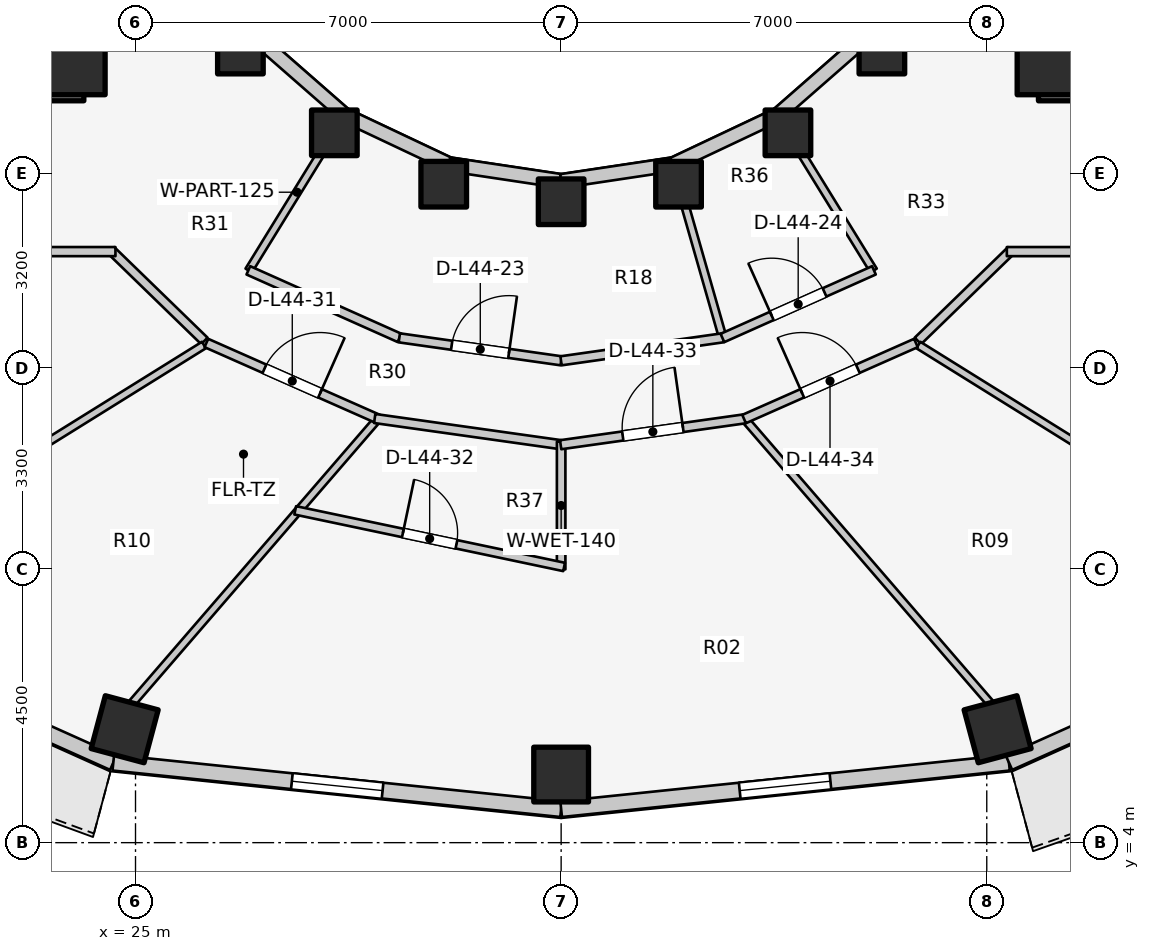
"""IFC4 building model, lengths in metres.
Left out: names, types, materials, properties, quantities, classifications, styles, units other than length and angle.
Written with IfcOpenShell. Run it as: python <this file> out.ifc"""

import sys

from ifc_helpers import new_model, si_unit, direction, frame, frame_2d, origin, origin_2d, place, context, subcontext, project, spatial, rectangle, extrude, element, fill, save


model = new_model("IFC4")
c1 = context("Model", 3, precision=1e-05, world=origin(), true_north=direction((0.0, 1.0)))
c2 = subcontext(c1, "Body", "Model", "MODEL_VIEW")
j1 = project(units=[si_unit("LENGTHUNIT", "METRE"), si_unit("PLANEANGLEUNIT", "RADIAN")], contexts=[c1])
p1 = place(None, origin())
s1 = spatial("IfcSite", under=j1, at=p1, CompositionType="ELEMENT")
p2 = place(p1, origin())
s2 = spatial("IfcBuilding", under=s1, at=p2, CompositionType="ELEMENT")
p3 = place(p2, frame((0.0, 0.0, 146.7)))
s3 = spatial("IfcBuildingStorey", under=s2, at=p3, CompositionType="ELEMENT", Elevation=146.7)
for number, where, z_axis, x_axis in (
    (1, (19.65, 16.55, 0.0), (0.0, 0.0, 1.0), (1.0, 0.0, 0.0)),
    (2, (39.85, 16.55, 0.0), (0.0, 0.0, 1.0), (1.0, 0.0, 0.0)),
):
    element("IfcWall", number, at=place(p3, frame(where, z_axis=z_axis, x_axis=x_axis)), inside=s3, PredefinedType="SHEAR", context=c2, shape_type="SweptSolid", body=[
        extrude(rectangle(XDim=4.5, YDim=0.7, at=frame_2d((2.25, 0.0))), origin(), (0.0, 0.0, 1.0), 3.1),
    ])
for number, where, z_axis, x_axis in (
    (3, (23.9, 16.9, 0.0), (0.0, 0.0, 1.0), (1.0, 0.0, 0.0)),
    (4, (40.1, 16.9, 0.0), (0.0, 0.0, 1.0), (1.0, 0.0, 0.0)),
):
    element("IfcColumn", number, at=place(p3, frame(where, z_axis=z_axis, x_axis=x_axis)), inside=s3, PredefinedType="COLUMN", context=c2, shape_type="SweptSolid", body=[
        extrude(rectangle(XDim=1.2, YDim=1.2, at=origin_2d()), origin(), (0.0, 0.0, 1.0), 3.1),
    ])
for number, where, z_axis, x_axis in (
    (5, (26.725, 17.018, 0.0), (0.0, 0.0, 1.0), (1.0, 0.0, 0.0)),
    (6, (28.27, 15.673, 0.0), (0.0, 0.0, 1.0), (1.0, 0.0, 0.0)),
    (7, (30.069, 14.828, 0.0), (0.0, 0.0, 1.0), (1.0, 0.0, 0.0)),
):
    element("IfcColumn", number, at=place(p3, frame(where, z_axis=z_axis, x_axis=x_axis)), inside=s3, PredefinedType="COLUMN", context=c2, shape_type="SweptSolid", body=[
        extrude(rectangle(XDim=0.75, YDim=0.75, at=origin_2d()), origin(), (0.0, 0.0, 1.0), 3.1),
    ])
p4 = place(p3, frame((24.822, 5.865, 0.0), z_axis=(0.0, 0.0, 1.0), x_axis=(-0.258819045103, -0.965925826289, 0.0)))
e8 = element("IfcColumn", 8, at=p4, inside=s3, PredefinedType="COLUMN", context=c2, shape_type="SweptSolid", body=[
    extrude(rectangle(XDim=0.9, YDim=0.9, at=origin_2d()), origin(), (0.0, 0.0, 1.0), 3.1),
])
p5 = place(p3, frame((32.0, 14.54, 0.0), z_axis=(0.0, 0.0, 1.0), x_axis=(1.0, 0.0, 0.0)))
e9 = element("IfcColumn", 9, at=p5, inside=s3, PredefinedType="COLUMN", context=c2, shape_type="SweptSolid", body=[
    extrude(rectangle(XDim=0.75, YDim=0.75, at=origin_2d()), origin(), (0.0, 0.0, 1.0), 3.1),
])
p6 = place(p3, frame((32.0, 5.12, 0.0), z_axis=(0.0, 0.0, 1.0), x_axis=(0.0, -1.0, 0.0)))
e10 = element("IfcColumn", 10, at=p6, inside=s3, PredefinedType="COLUMN", context=c2, shape_type="SweptSolid", body=[
    extrude(rectangle(XDim=0.9, YDim=0.9, at=origin_2d()), origin(), (0.0, 0.0, 1.0), 3.1),
])
p7 = place(p3, frame((33.931, 14.828, 0.0), z_axis=(0.0, 0.0, 1.0), x_axis=(1.0, 0.0, 0.0)))
e11 = element("IfcColumn", 11, at=p7, inside=s3, PredefinedType="COLUMN", context=c2, shape_type="SweptSolid", body=[
    extrude(rectangle(XDim=0.75, YDim=0.75, at=origin_2d()), origin(), (0.0, 0.0, 1.0), 3.1),
])
p8 = place(p3, frame((39.178, 5.865, 0.0), z_axis=(0.0, 0.0, 1.0), x_axis=(0.258819045103, -0.965925826289, 0.0)))
e12 = element("IfcColumn", 12, at=p8, inside=s3, PredefinedType="COLUMN", context=c2, shape_type="SweptSolid", body=[
    extrude(rectangle(XDim=0.9, YDim=0.9, at=origin_2d()), origin(), (0.0, 0.0, 1.0), 3.1),
])
for number, where, z_axis, x_axis in (
    (13, (35.73, 15.673, 0.0), (0.0, 0.0, 1.0), (1.0, 0.0, 0.0)),
    (14, (37.275, 17.018, 0.0), (0.0, 0.0, 1.0), (1.0, 0.0, 0.0)),
):
    element("IfcColumn", number, at=place(p3, frame(where, z_axis=z_axis, x_axis=x_axis)), inside=s3, PredefinedType="COLUMN", context=c2, shape_type="SweptSolid", body=[
        extrude(rectangle(XDim=0.75, YDim=0.75, at=origin_2d()), origin(), (0.0, 0.0, 1.0), 3.1),
    ])
p9 = place(p3, frame((26.965, 17.258, 0.0), z_axis=(0.0, 0.0, 1.0), x_axis=(0.752576694707, -0.658504607869, 0.0)))
e15 = element("IfcWall", 15, at=p9, inside=s3, PredefinedType="STANDARD", context=c2, shape_type="SweptSolid", body=[
    extrude(rectangle(XDim=1.959, YDim=0.23, at=frame_2d((0.98, 0.0))), origin(), (0.0, 0.0, 1.0), 2.16),
])
p10 = place(p3, frame((28.44, 15.968, 0.0), z_axis=(0.0, 0.0, 1.0), x_axis=(0.904179699603, -0.427152280606, 0.0)))
e16 = element("IfcWall", 16, at=p10, inside=s3, PredefinedType="STANDARD", context=c2, shape_type="SweptSolid", body=[
    extrude(rectangle(XDim=1.899, YDim=0.23, at=frame_2d((0.95, 0.0))), origin(), (0.0, 0.0, 1.0), 2.16),
])
for number, where, z_axis, x_axis in (
    (17, (30.157, 15.157, 0.0), (0.0, 0.0, 1.0), (0.989, -0.149, 0.0)),
    (18, (32.0, 14.88, 0.0), (0.0, 0.0, 1.0), (0.989, 0.149, 0.0)),
):
    element("IfcWall", number, at=place(p3, frame(where, z_axis=z_axis, x_axis=x_axis)), inside=s3, PredefinedType="STANDARD", context=c2, shape_type="SweptSolid", body=[
        extrude(rectangle(XDim=1.864, YDim=0.23, at=frame_2d((0.932, 0.0))), origin(), (0.0, 0.0, 1.0), 2.16),
    ])
p11 = place(p3, frame((33.843, 15.157, 0.0), z_axis=(0.0, 0.0, 1.0), x_axis=(0.904179699603, 0.427152280606, 0.0)))
e19 = element("IfcWall", 19, at=p11, inside=s3, PredefinedType="STANDARD", context=c2, shape_type="SweptSolid", body=[
    extrude(rectangle(XDim=1.899, YDim=0.23, at=frame_2d((0.95, 0.0))), origin(), (0.0, 0.0, 1.0), 2.16),
])
p12 = place(p3, frame((35.56, 15.968, 0.0), z_axis=(0.0, 0.0, 1.0), x_axis=(0.752576694707, 0.658504607869, 0.0)))
e20 = element("IfcWall", 20, at=p12, inside=s3, PredefinedType="STANDARD", context=c2, shape_type="SweptSolid", body=[
    extrude(rectangle(XDim=1.959, YDim=0.23, at=frame_2d((0.98, 0.0))), origin(), (0.0, 0.0, 1.0), 2.16),
])
p13 = place(p3, frame((19.587, 7.581, 0.0), z_axis=(0.0, 0.0, 1.0), x_axis=(0.912353637112, -0.409403029847, 0.0)))
e21 = element("IfcWall", 21, at=p13, inside=s3, PredefinedType="STANDARD", context=c2, shape_type="SweptSolid", body=[
    extrude(rectangle(XDim=5.533, YDim=0.26, at=frame_2d((2.766, 0.0))), origin(), (0.0, 0.0, 1.0), 2.88),
])
p14 = place(p13, frame((2.167, 0.0, 0.0)))
e22 = element("IfcOpeningElement", 22, at=p14, cuts=e21, PredefinedType="OPENING", context=c2, shape_type="SweptSolid", body=[
    extrude(rectangle(XDim=1.2, YDim=2.2, at=frame_2d((0.6, 1.1))), frame((0.0, 0.14, 0.0), z_axis=(0.0, -1.0, 0.0), x_axis=(1.0, 0.0, 0.0)), (0.0, 0.0, 1.0), 0.28),
])
p15 = place(p3, frame((24.635, 5.315, 0.0), z_axis=(0.0, 0.0, 1.0), x_axis=(0.994664178965, -0.10316574569, 0.0)))
e23 = element("IfcWall", 23, at=p15, inside=s3, PredefinedType="STANDARD", context=c2, shape_type="SweptSolid", body=[
    extrude(rectangle(XDim=7.405, YDim=0.26, at=frame_2d((3.702, 0.0))), origin(), (0.0, 0.0, 1.0), 2.85),
])
p16 = place(p15, frame((2.952, 0.0, 0.75)))
e24 = element("IfcOpeningElement", 24, at=p16, cuts=e23, PredefinedType="OPENING", context=c2, shape_type="SweptSolid", body=[
    extrude(rectangle(XDim=1.5, YDim=1.6, at=frame_2d((0.75, 0.8))), frame((0.0, 0.14, 0.0), z_axis=(0.0, -1.0, 0.0), x_axis=(1.0, 0.0, 0.0)), (0.0, 0.0, 1.0), 0.28),
])
p17 = place(p3, frame((32.0, 4.552, 0.0), z_axis=(0.0, 0.0, 1.0), x_axis=(0.994664178965, 0.10316574569, 0.0)))
e25 = element("IfcWall", 25, at=p17, inside=s3, PredefinedType="STANDARD", context=c2, shape_type="SweptSolid", body=[
    extrude(rectangle(XDim=7.405, YDim=0.26, at=frame_2d((3.702, 0.0))), origin(), (0.0, 0.0, 1.0), 2.85),
])
p18 = place(p17, frame((2.952, 0.0, 0.75)))
e26 = element("IfcOpeningElement", 26, at=p18, cuts=e25, PredefinedType="OPENING", context=c2, shape_type="SweptSolid", body=[
    extrude(rectangle(XDim=1.5, YDim=1.6, at=frame_2d((0.75, 0.8))), frame((0.0, 0.14, 0.0), z_axis=(0.0, -1.0, 0.0), x_axis=(1.0, 0.0, 0.0)), (0.0, 0.0, 1.0), 0.28),
])
p19 = place(p3, frame((39.365, 5.315, 0.0), z_axis=(0.0, 0.0, 1.0), x_axis=(0.912353637112, 0.409403029847, 0.0)))
e27 = element("IfcWall", 27, at=p19, inside=s3, PredefinedType="STANDARD", context=c2, shape_type="SweptSolid", body=[
    extrude(rectangle(XDim=5.533, YDim=0.26, at=frame_2d((2.766, 0.0))), origin(), (0.0, 0.0, 1.0), 2.88),
])
p20 = place(p19, frame((2.167, 0.0, 0.0)))
e28 = element("IfcOpeningElement", 28, at=p20, cuts=e27, PredefinedType="OPENING", context=c2, shape_type="SweptSolid", body=[
    extrude(rectangle(XDim=1.2, YDim=2.2, at=frame_2d((0.6, 1.1))), frame((0.0, 0.14, 0.0), z_axis=(0.0, -1.0, 0.0), x_axis=(1.0, 0.0, 0.0)), (0.0, 0.0, 1.0), 0.28),
])
p21 = place(p3, frame((26.133, 12.251, 0.0), z_axis=(0.0, 0.0, 1.0), x_axis=(-0.717419568599, 0.696641344302, 0.0)))
e29 = element("IfcWall", 29, at=p21, inside=s3, PredefinedType="PARTITIONING", context=c2, shape_type="SweptSolid", body=[
    extrude(rectangle(XDim=2.138, YDim=0.15, at=frame_2d((1.069, 0.0))), origin(), (0.0, 0.0, 1.0), 2.299),
])
p22 = place(p3, frame((17.15, 13.72, 0.0), z_axis=(0.0, 0.0, 1.0), x_axis=(1.0, 0.0, 0.0)))
e30 = element("IfcWall", 30, at=p22, inside=s3, PredefinedType="PARTITIONING", context=c2, shape_type="SweptSolid", body=[
    extrude(rectangle(XDim=7.52, YDim=0.15, at=frame_2d((3.76, 0.0))), origin(), (0.0, 0.0, 1.0), 2.299),
])
p23 = place(p22, frame((1.3, 0.0, 0.0)))
e31 = element("IfcOpeningElement", 31, at=p23, cuts=e30, PredefinedType="OPENING", context=c2, shape_type="SweptSolid", body=[
    extrude(rectangle(XDim=0.9, YDim=2.1, at=frame_2d((0.45, 1.05))), frame((0.0, 0.085, 0.0), z_axis=(0.0, -1.0, 0.0), x_axis=(1.0, 0.0, 0.0)), (0.0, 0.0, 1.0), 0.17),
])
p24 = place(p3, frame((37.867, 12.251, 0.0), z_axis=(0.0, 0.0, 1.0), x_axis=(0.717419568599, 0.696641344302, 0.0)))
e32 = element("IfcWall", 32, at=p24, inside=s3, PredefinedType="PARTITIONING", context=c2, shape_type="SweptSolid", body=[
    extrude(rectangle(XDim=2.138, YDim=0.15, at=frame_2d((1.069, 0.0))), origin(), (0.0, 0.0, 1.0), 2.299),
])
p25 = place(p3, frame((39.33, 13.72, 0.0), z_axis=(0.0, 0.0, 1.0), x_axis=(1.0, 0.0, 0.0)))
e33 = element("IfcWall", 33, at=p25, inside=s3, PredefinedType="PARTITIONING", context=c2, shape_type="SweptSolid", body=[
    extrude(rectangle(XDim=7.52, YDim=0.15, at=frame_2d((3.76, 0.0))), origin(), (0.0, 0.0, 1.0), 2.299),
])
p26 = place(p25, frame((5.22, 0.0, 0.0)))
e34 = element("IfcOpeningElement", 34, at=p26, cuts=e33, PredefinedType="OPENING", context=c2, shape_type="SweptSolid", body=[
    extrude(rectangle(XDim=0.9, YDim=2.1, at=frame_2d((0.45, 1.05))), frame((0.0, 0.085, 0.0), z_axis=(0.0, -1.0, 0.0), x_axis=(1.0, 0.0, 0.0)), (0.0, 0.0, 1.0), 0.17),
])
p27 = place(p3, frame((28.45, 15.985, 0.0), z_axis=(0.0, 0.0, 1.0), x_axis=(-0.524565340045, -0.851370192116, 0.0)))
e35 = element("IfcWall", 35, at=p27, inside=s3, PredefinedType="PARTITIONING", context=c2, shape_type="SweptSolid", body=[
    extrude(rectangle(XDim=3.027, YDim=0.125, at=frame_2d((1.514, 0.0))), origin(), (0.0, 0.0, 1.0), 2.299),
])
p28 = place(p3, frame((33.838, 15.176, 0.0), z_axis=(0.0, 0.0, 1.0), x_axis=(0.274947609893, -0.961459209647, 0.0)))
e36 = element("IfcWall", 36, at=p28, inside=s3, PredefinedType="PARTITIONING", context=c2, shape_type="SweptSolid", body=[
    extrude(rectangle(XDim=2.99, YDim=0.125, at=frame_2d((1.495, 0.0))), origin(), (0.0, 0.0, 1.0), 2.299),
])
p29 = place(p3, frame((35.55, 15.985, 0.0), z_axis=(0.0, 0.0, 1.0), x_axis=(0.524565340045, -0.851370192116, 0.0)))
e37 = element("IfcWall", 37, at=p29, inside=s3, PredefinedType="PARTITIONING", context=c2, shape_type="SweptSolid", body=[
    extrude(rectangle(XDim=3.027, YDim=0.125, at=frame_2d((1.514, 0.0))), origin(), (0.0, 0.0, 1.0), 2.299),
])
p30 = place(p3, frame((26.856, 13.412, 0.0), z_axis=(0.0, 0.0, 1.0), x_axis=(0.912985265053, -0.407992531545, 0.0)))
e38 = element("IfcWall", 38, at=p30, inside=s3, PredefinedType="PARTITIONING", context=c2, shape_type="SweptSolid", body=[
    extrude(rectangle(XDim=2.723, YDim=0.15, at=frame_2d((1.362, 0.0))), origin(), (0.0, 0.0, 1.0), 2.299),
])
p31 = place(p3, frame((29.339, 12.302, 0.0), z_axis=(0.0, 0.0, 1.0), x_axis=(0.990079774468, -0.140506370634, 0.0)))
e39 = element("IfcWall", 39, at=p31, inside=s3, PredefinedType="PARTITIONING", context=c2, shape_type="SweptSolid", body=[
    extrude(rectangle(XDim=2.69, YDim=0.15, at=frame_2d((1.345, 0.0))), origin(), (0.0, 0.0, 1.0), 2.299),
])
p32 = place(p31, frame((0.87, 0.0, 0.0)))
e40 = element("IfcOpeningElement", 40, at=p32, cuts=e39, PredefinedType="OPENING", context=c2, shape_type="SweptSolid", body=[
    extrude(rectangle(XDim=0.95, YDim=2.1, at=frame_2d((0.475, 1.05))), frame((0.0, 0.085, 0.0), z_axis=(0.0, -1.0, 0.0), x_axis=(1.0, 0.0, 0.0)), (0.0, 0.0, 1.0), 0.17),
])
p33 = place(p3, frame((31.998, 11.924, 0.0), z_axis=(0.0, 0.0, 1.0), x_axis=(0.990041682628, 0.140774524184, 0.0)))
e41 = element("IfcWall", 41, at=p33, inside=s3, PredefinedType="PARTITIONING", context=c2, shape_type="SweptSolid", body=[
    extrude(rectangle(XDim=2.695, YDim=0.15, at=frame_2d((1.348, 0.0))), origin(), (0.0, 0.0, 1.0), 2.299),
])
p34 = place(p3, frame((34.653, 12.299, 0.0), z_axis=(0.0, 0.0, 1.0), x_axis=(0.913112902883, 0.407706789971, 0.0)))
e42 = element("IfcWall", 42, at=p34, inside=s3, PredefinedType="PARTITIONING", context=c2, shape_type="SweptSolid", body=[
    extrude(rectangle(XDim=2.729, YDim=0.15, at=frame_2d((1.364, 0.0))), origin(), (0.0, 0.0, 1.0), 2.299),
])
p35 = place(p34, frame((0.889, 0.0, 0.0)))
e43 = element("IfcOpeningElement", 43, at=p35, cuts=e42, PredefinedType="OPENING", context=c2, shape_type="SweptSolid", body=[
    extrude(rectangle(XDim=0.95, YDim=2.1, at=frame_2d((0.475, 1.05))), frame((0.0, 0.085, 0.0), z_axis=(0.0, -1.0, 0.0), x_axis=(1.0, 0.0, 0.0)), (0.0, 0.0, 1.0), 0.17),
])
p36 = place(p3, frame((26.125, 12.184, 0.0), z_axis=(0.0, 0.0, 1.0), x_axis=(-0.849008457073, -0.528379257559, 0.0)))
e44 = element("IfcWall", 44, at=p36, inside=s3, PredefinedType="PARTITIONING", context=c2, shape_type="SweptSolid", body=[
    extrude(rectangle(XDim=7.077, YDim=0.125, at=frame_2d((3.539, 0.0))), origin(), (0.0, 0.0, 1.0), 2.299),
])
for number, where, z_axis, x_axis in (
    (45, (28.947, 10.927, 0.0), (0.0, 0.0, 1.0), (-0.654, -0.757, 0.0)),
    (46, (35.053, 10.927, 0.0), (0.0, 0.0, 1.0), (0.654, -0.757, 0.0)),
):
    element("IfcWall", number, at=place(p3, frame(where, z_axis=z_axis, x_axis=x_axis)), inside=s3, PredefinedType="PARTITIONING", context=c2, shape_type="SweptSolid", body=[
        extrude(rectangle(XDim=6.14, YDim=0.125, at=frame_2d((3.07, 0.0))), origin(), (0.0, 0.0, 1.0), 2.299),
    ])
p37 = place(p3, frame((37.875, 12.184, 0.0), z_axis=(0.0, 0.0, 1.0), x_axis=(0.849008457073, -0.528379257559, 0.0)))
e47 = element("IfcWall", 47, at=p37, inside=s3, PredefinedType="PARTITIONING", context=c2, shape_type="SweptSolid", body=[
    extrude(rectangle(XDim=7.077, YDim=0.125, at=frame_2d((3.539, 0.0))), origin(), (0.0, 0.0, 1.0), 2.299),
])
p38 = place(p3, frame((26.165, 12.217, 0.0), z_axis=(0.0, 0.0, 1.0), x_axis=(0.91445214467, -0.404694051239, 0.0)))
e48 = element("IfcWall", 48, at=p38, inside=s3, PredefinedType="PARTITIONING", context=c2, shape_type="SweptSolid", body=[
    extrude(rectangle(XDim=3.091, YDim=0.15, at=frame_2d((1.545, 0.0))), origin(), (0.0, 0.0, 1.0), 2.299),
])
p39 = place(p38, frame((1.045, 0.0, 0.0)))
e49 = element("IfcOpeningElement", 49, at=p39, cuts=e48, PredefinedType="OPENING", context=c2, shape_type="SweptSolid", body=[
    extrude(rectangle(XDim=1.0, YDim=2.1, at=frame_2d((0.5, 1.05))), frame((0.0, 0.085, 0.0), z_axis=(0.0, -1.0, 0.0), x_axis=(1.0, 0.0, 0.0)), (0.0, 0.0, 1.0), 0.17),
])
p40 = place(p3, frame((28.934, 10.975, 0.0), z_axis=(0.0, 0.0, 1.0), x_axis=(0.990254405439, -0.139270285808, 0.0)))
e50 = element("IfcWall", 50, at=p40, inside=s3, PredefinedType="PARTITIONING", context=c2, shape_type="SweptSolid", body=[
    extrude(rectangle(XDim=3.147, YDim=0.15, at=frame_2d((1.573, 0.0))), origin(), (0.0, 0.0, 1.0), 2.299),
])
p41 = place(p3, frame((32.0, 10.594, 0.0), z_axis=(0.0, 0.0, 1.0), x_axis=(0.0, -1.0, 0.0)))
e51 = element("IfcWall", 51, at=p41, inside=s3, PredefinedType="PLUMBINGWALL", context=c2, shape_type="SweptSolid", body=[
    extrude(rectangle(XDim=2.1, YDim=0.14, at=frame_2d((1.05, 0.0))), origin(), (0.0, 0.0, 1.0), 2.299),
])
p42 = place(p3, frame((27.627, 9.465, 0.0), z_axis=(0.0, 0.0, 1.0), x_axis=(0.97851996891, -0.206152056609, 0.0)))
e52 = element("IfcWall", 52, at=p42, inside=s3, PredefinedType="PLUMBINGWALL", context=c2, shape_type="SweptSolid", body=[
    extrude(rectangle(XDim=4.519, YDim=0.14, at=frame_2d((2.26, 0.0))), origin(), (0.0, 0.0, 1.0), 2.299),
])
p43 = place(p42, frame((1.81, 0.0, 0.0)))
e53 = element("IfcOpeningElement", 53, at=p43, cuts=e52, PredefinedType="OPENING", context=c2, shape_type="SweptSolid", body=[
    extrude(rectangle(XDim=0.9, YDim=2.1, at=frame_2d((0.45, 1.05))), frame((0.0, 0.08, 0.0), z_axis=(0.0, -1.0, 0.0), x_axis=(1.0, 0.0, 0.0)), (0.0, 0.0, 1.0), 0.16),
])
p44 = place(p3, frame((31.992, 10.544, 0.0), z_axis=(0.0, 0.0, 1.0), x_axis=(0.990243864279, 0.139345216129, 0.0)))
e54 = element("IfcWall", 54, at=p44, inside=s3, PredefinedType="PARTITIONING", context=c2, shape_type="SweptSolid", body=[
    extrude(rectangle(XDim=3.062, YDim=0.15, at=frame_2d((1.531, 0.0))), origin(), (0.0, 0.0, 1.0), 2.299),
])
p45 = place(p44, frame((1.031, 0.0, 0.0)))
e55 = element("IfcOpeningElement", 55, at=p45, cuts=e54, PredefinedType="OPENING", context=c2, shape_type="SweptSolid", body=[
    extrude(rectangle(XDim=1.0, YDim=2.1, at=frame_2d((0.5, 1.05))), frame((0.0, 0.085, 0.0), z_axis=(0.0, -1.0, 0.0), x_axis=(1.0, 0.0, 0.0)), (0.0, 0.0, 1.0), 0.17),
])
p46 = place(p3, frame((35.009, 10.966, 0.0), z_axis=(0.0, 0.0, 1.0), x_axis=(0.91445214467, 0.404694051239, 0.0)))
e56 = element("IfcWall", 56, at=p46, inside=s3, PredefinedType="PARTITIONING", context=c2, shape_type="SweptSolid", body=[
    extrude(rectangle(XDim=3.091, YDim=0.15, at=frame_2d((1.545, 0.0))), origin(), (0.0, 0.0, 1.0), 2.299),
])
p47 = place(p46, frame((1.045, 0.0, 0.0)))
e57 = element("IfcOpeningElement", 57, at=p47, cuts=e56, PredefinedType="OPENING", context=c2, shape_type="SweptSolid", body=[
    extrude(rectangle(XDim=1.0, YDim=2.1, at=frame_2d((0.5, 1.05))), frame((0.0, 0.085, 0.0), z_axis=(0.0, -1.0, 0.0), x_axis=(1.0, 0.0, 0.0)), (0.0, 0.0, 1.0), 0.17),
])
p48 = place(p16, origin())
e58 = element("IfcWindow", 58, at=p48, inside=s3, PartitioningType="SINGLE_PANEL", PredefinedType="WINDOW", context=c2, shape_type="SweptSolid", body=[
    extrude(rectangle(XDim=1.5, YDim=1.6, at=frame_2d((0.75, 0.8))), frame((0.0, 0.03, 0.0), z_axis=(0.0, -1.0, 0.0), x_axis=(1.0, 0.0, 0.0)), (0.0, 0.0, 1.0), 0.06),
])
fill(e24, e58)
p49 = place(p18, origin())
e59 = element("IfcWindow", 59, at=p49, inside=s3, PartitioningType="SINGLE_PANEL", PredefinedType="WINDOW", context=c2, shape_type="SweptSolid", body=[
    extrude(rectangle(XDim=1.5, YDim=1.6, at=frame_2d((0.75, 0.8))), frame((0.0, 0.03, 0.0), z_axis=(0.0, -1.0, 0.0), x_axis=(1.0, 0.0, 0.0)), (0.0, 0.0, 1.0), 0.06),
])
fill(e26, e59)
p50 = place(p32, origin())
e60 = element("IfcDoor", 60, at=p50, inside=s3, OperationType="SINGLE_SWING_RIGHT", PredefinedType="DOOR", context=c2, shape_type="SweptSolid", body=[
    extrude(rectangle(XDim=0.95, YDim=2.1, at=frame_2d((0.475, 1.05))), frame((0.0, 0.025, 0.0), z_axis=(0.0, -1.0, 0.0), x_axis=(1.0, 0.0, 0.0)), (0.0, 0.0, 1.0), 0.05),
])
fill(e40, e60)
p51 = place(p35, origin())
e61 = element("IfcDoor", 61, at=p51, inside=s3, OperationType="SINGLE_SWING_LEFT", PredefinedType="DOOR", context=c2, shape_type="SweptSolid", body=[
    extrude(rectangle(XDim=0.95, YDim=2.1, at=frame_2d((0.475, 1.05))), frame((0.0, 0.025, 0.0), z_axis=(0.0, -1.0, 0.0), x_axis=(1.0, 0.0, 0.0)), (0.0, 0.0, 1.0), 0.05),
])
fill(e43, e61)
p52 = place(p39, origin())
e62 = element("IfcDoor", 62, at=p52, inside=s3, OperationType="SINGLE_SWING_RIGHT", PredefinedType="DOOR", context=c2, shape_type="SweptSolid", body=[
    extrude(rectangle(XDim=1.0, YDim=2.1, at=frame_2d((0.5, 1.05))), frame((0.0, 0.025, 0.0), z_axis=(0.0, -1.0, 0.0), x_axis=(1.0, 0.0, 0.0)), (0.0, 0.0, 1.0), 0.05),
])
fill(e49, e62)
p53 = place(p43, origin())
e63 = element("IfcDoor", 63, at=p53, inside=s3, OperationType="SINGLE_SWING_LEFT", PredefinedType="DOOR", context=c2, shape_type="SweptSolid", body=[
    extrude(rectangle(XDim=0.9, YDim=2.1, at=frame_2d((0.45, 1.05))), frame((0.0, 0.025, 0.0), z_axis=(0.0, -1.0, 0.0), x_axis=(1.0, 0.0, 0.0)), (0.0, 0.0, 1.0), 0.05),
])
fill(e53, e63)
p54 = place(p45, origin())
e64 = element("IfcDoor", 64, at=p54, inside=s3, OperationType="SINGLE_SWING_RIGHT", PredefinedType="DOOR", context=c2, shape_type="SweptSolid", body=[
    extrude(rectangle(XDim=1.0, YDim=2.1, at=frame_2d((0.5, 1.05))), frame((0.0, 0.025, 0.0), z_axis=(0.0, -1.0, 0.0), x_axis=(1.0, 0.0, 0.0)), (0.0, 0.0, 1.0), 0.05),
])
fill(e55, e64)
p55 = place(p47, origin())
e65 = element("IfcDoor", 65, at=p55, inside=s3, OperationType="SINGLE_SWING_LEFT", PredefinedType="DOOR", context=c2, shape_type="SweptSolid", body=[
    extrude(rectangle(XDim=1.0, YDim=2.1, at=frame_2d((0.5, 1.05))), frame((0.0, 0.025, 0.0), z_axis=(0.0, -1.0, 0.0), x_axis=(1.0, 0.0, 0.0)), (0.0, 0.0, 1.0), 0.05),
])
fill(e57, e65)
save(model, sys.argv[1])
